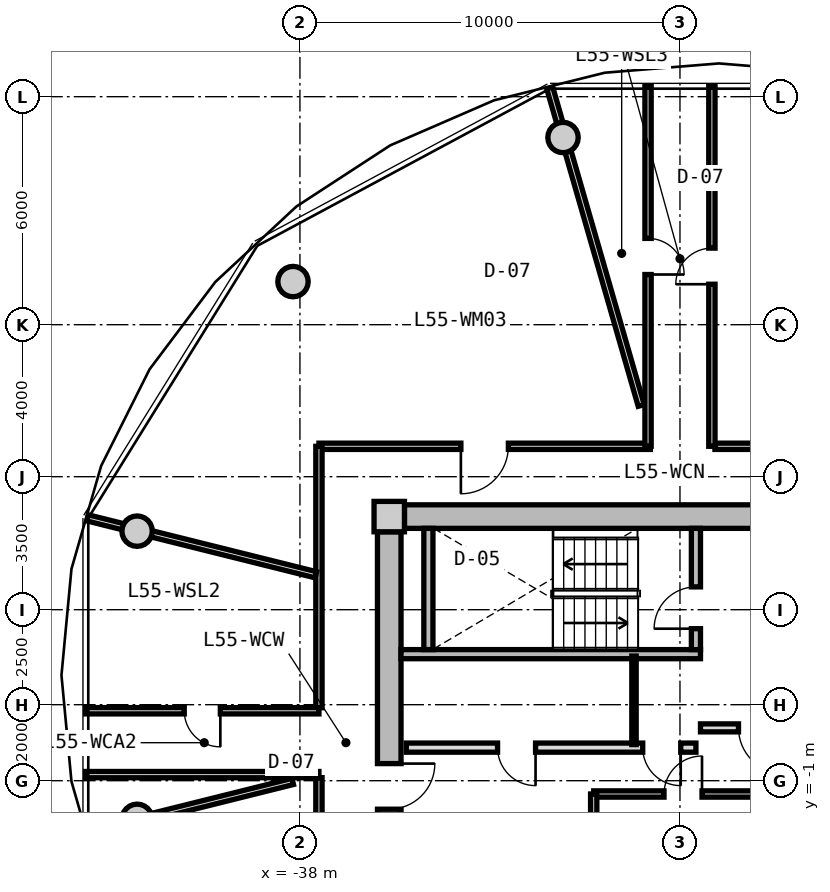
"""IFC4 building model, lengths in metres.
Left out: names, types, materials, properties, quantities, classifications, styles, units other than length and angle.
Written with IfcOpenShell. Run it as: python <this file> out.ifc"""

import sys

from ifc_helpers import new_model, si_unit, direction, frame, frame_2d, origin, origin_2d, place, context, subcontext, project, spatial, rectangle, circle, extrude, source, transform, mapped, element, fill, save


model = new_model("IFC4")
c1 = context("Model", 3, precision=1e-05, world=origin(), true_north=direction((0.0, 1.0)))
c2 = subcontext(c1, "Body", "Model", "MODEL_VIEW")
j1 = project(units=[si_unit("LENGTHUNIT", "METRE"), si_unit("PLANEANGLEUNIT", "RADIAN")], contexts=[c1])
p1 = place(None, origin())
s1 = spatial("IfcSite", under=j1, at=p1, CompositionType="ELEMENT")
p2 = place(p1, origin())
s2 = spatial("IfcBuilding", under=s1, at=p2, CompositionType="ELEMENT")
p3 = place(p2, frame((0.0, 0.0, 177.0)))
s3 = spatial("IfcBuildingStorey", under=s2, at=p3, CompositionType="ELEMENT", Elevation=177.0)
m1 = source(origin(), c2, "Body", "SweptSolid", [
    extrude(rectangle(XDim=0.8, YDim=0.8, at=origin_2d()), origin(), (0.0, 0.0, 1.0), 3.05),
])
p4 = place(p3, frame((-35.65, 5.95, 0.0), z_axis=(0.0, 0.0, 1.0), x_axis=(1.0, 0.0, 0.0)))
e1 = element("IfcColumn", 1, at=p4, inside=s3, PredefinedType="COLUMN", context=c2, shape_type="MappedRepresentation", body=[
    mapped(m1, transform((0.0, 0.0, 0.0), x_axis=(1.0, 0.0, 0.0), y_axis=(0.0, 1.0, 0.0), z_axis=(0.0, 0.0, 1.0), scale=1.0)),
])
m2 = source(origin(), c2, "Body", "SweptSolid", [
    extrude(rectangle(XDim=14.5, YDim=0.62, at=frame_2d((7.25, 0.0))), origin(), (0.0, 0.0, 1.0), 2.81),
])
p5 = place(p3, frame((-35.25, 5.95, 0.0), z_axis=(0.0, 0.0, 1.0), x_axis=(1.0, 0.0, 0.0)))
e2 = element("IfcWall", 2, at=p5, inside=s3, PredefinedType="SHEAR", context=c2, shape_type="MappedRepresentation", body=[
    mapped(m2, transform((0.0, 0.0, 0.0), x_axis=(1.0, 0.0, 0.0), y_axis=(0.0, 1.0, 0.0), z_axis=(0.0, 0.0, 1.0), scale=1.0)),
])
m3 = source(origin(), c2, "Body", "SweptSolid", [
    extrude(rectangle(XDim=11.1, YDim=0.62, at=frame_2d((5.55, 0.0))), origin(), (0.0, 0.0, 1.0), 2.81),
])
p6 = place(p3, frame((-35.65, -5.55, 0.0), z_axis=(0.0, 0.0, 1.0), x_axis=(0.0, 1.0, 0.0)))
e3 = element("IfcWall", 3, at=p6, inside=s3, PredefinedType="SHEAR", context=c2, shape_type="MappedRepresentation", body=[
    mapped(m3, transform((0.0, 0.0, 0.0), x_axis=(1.0, 0.0, 0.0), y_axis=(0.0, 1.0, 0.0), z_axis=(0.0, 0.0, 1.0), scale=1.0)),
])
p7 = place(p6, frame((3.8, 0.0, 0.0)))
e4 = element("IfcOpeningElement", 4, at=p7, cuts=e3, PredefinedType="OPENING", context=c2, shape_type="SweptSolid", body=[
    extrude(rectangle(XDim=1.2, YDim=2.15, at=frame_2d((0.6, 1.075))), frame((0.0, 0.32, 0.0), z_axis=(0.0, -1.0, 0.0), x_axis=(1.0, 0.0, 0.0)), (0.0, 0.0, 1.0), 0.64),
])
m4 = source(origin(), c2, "Body", "SweptSolid", [
    extrude(circle(Radius=0.4, at=origin_2d()), origin(), (0.0, 0.0, 1.0), 3.05),
])
for number, where, z_axis, x_axis in (
    (5, (-31.077, 15.926, 0.0), (0.0, 0.0, 1.0), (1.0, 0.0, 0.0)),
    (6, (-38.183, 12.135, 0.0), (0.0, 0.0, 1.0), (1.0, 0.0, 0.0)),
    (7, (-42.285, 5.567, 0.0), (0.0, 0.0, 1.0), (1.0, 0.0, 0.0)),
    (8, (-42.285, -2.016, 0.0), (0.0, 0.0, 1.0), (1.0, 0.0, 0.0)),
):
    element("IfcColumn", number, at=place(p3, frame(where, z_axis=z_axis, x_axis=x_axis)), inside=s3, PredefinedType="COLUMN", context=c2, shape_type="MappedRepresentation", body=[
        mapped(m4, transform((0.0, 0.0, 0.0), x_axis=(1.0, 0.0, 0.0), y_axis=(0.0, 1.0, 0.0), z_axis=(0.0, 0.0, 1.0), scale=1.0)),
    ])
m5 = source(origin(), c2, "Body", "SweptSolid", [
    extrude(rectangle(XDim=7.88, YDim=0.24, at=frame_2d((3.94, 0.0))), origin(), (0.0, 0.0, 1.0), 2.81),
])
p8 = place(p3, frame((-35.34, 2.33, 0.0), z_axis=(0.0, 0.0, 1.0), x_axis=(1.0, 0.0, 0.0)))
e9 = element("IfcWall", 9, at=p8, inside=s3, PredefinedType="PARTITIONING", context=c2, shape_type="MappedRepresentation", body=[
    mapped(m5, transform((0.0, 0.0, 0.0), x_axis=(1.0, 0.0, 0.0), y_axis=(0.0, 1.0, 0.0), z_axis=(0.0, 0.0, 1.0), scale=1.0)),
])
m6 = source(origin(), c2, "Body", "SweptSolid", [
    extrude(rectangle(XDim=3.19, YDim=0.24, at=frame_2d((1.595, 0.0))), origin(), (0.0, 0.0, 1.0), 2.81),
])
p9 = place(p3, frame((-34.62, 2.45, 0.0), z_axis=(0.0, 0.0, 1.0), x_axis=(0.0, 1.0, 0.0)))
e10 = element("IfcWall", 10, at=p9, inside=s3, PredefinedType="PARTITIONING", context=c2, shape_type="MappedRepresentation", body=[
    mapped(m6, transform((0.0, 0.0, 0.0), x_axis=(1.0, 0.0, 0.0), y_axis=(0.0, 1.0, 0.0), z_axis=(0.0, 0.0, 1.0), scale=1.0)),
])
p10 = place(p3, frame((-27.58, 2.45, 0.0), z_axis=(0.0, 0.0, 1.0), x_axis=(0.0, 1.0, 0.0)))
e11 = element("IfcWall", 11, at=p10, inside=s3, PredefinedType="PARTITIONING", context=c2, shape_type="MappedRepresentation", body=[
    mapped(m6, transform((0.0, 0.0, 0.0), x_axis=(1.0, 0.0, 0.0), y_axis=(0.0, 1.0, 0.0), z_axis=(0.0, 0.0, 1.0), scale=1.0)),
])
p11 = place(p10, frame((0.55, 0.0, 0.0)))
e12 = element("IfcOpeningElement", 12, at=p11, cuts=e11, PredefinedType="OPENING", context=c2, shape_type="SweptSolid", body=[
    extrude(rectangle(XDim=1.1, YDim=2.15, at=frame_2d((0.55, 1.075))), frame((0.0, 0.13, 0.0), z_axis=(0.0, -1.0, 0.0), x_axis=(1.0, 0.0, 0.0)), (0.0, 0.0, 1.0), 0.26),
])
m7 = source(origin(), c2, "Body", "SweptSolid", [
    extrude(rectangle(XDim=6.66, YDim=0.21, at=frame_2d((3.33, 0.0))), origin(), (0.0, 0.0, 1.0), 2.795),
])
p12 = place(p3, frame((-27.46, 0.39, 0.0), z_axis=(0.0, 0.0, 1.0), x_axis=(1.0, 0.0, 0.0)))
e13 = element("IfcWall", 13, at=p12, inside=s3, PredefinedType="PARTITIONING", context=c2, shape_type="MappedRepresentation", body=[
    mapped(m7, transform((0.0, 0.0, 0.0), x_axis=(1.0, 0.0, 0.0), y_axis=(0.0, 1.0, 0.0), z_axis=(0.0, 0.0, 1.0), scale=1.0)),
])
p13 = place(p12, frame((1.0, 0.0, 0.0)))
e14 = element("IfcOpeningElement", 14, at=p13, cuts=e13, PredefinedType="OPENING", context=c2, shape_type="SweptSolid", body=[
    extrude(rectangle(XDim=1.2, YDim=2.15, at=frame_2d((0.6, 1.075))), frame((0.0, 0.115, 0.0), z_axis=(0.0, -1.0, 0.0), x_axis=(1.0, 0.0, 0.0)), (0.0, 0.0, 1.0), 0.23),
])
m8 = source(origin(), c2, "Body", "SweptSolid", [
    extrude(rectangle(XDim=7.62, YDim=0.24, at=frame_2d((3.81, 0.0))), origin(), (0.0, 0.0, 1.0), 2.795),
])
p14 = place(p3, frame((-35.2, -0.13, 0.0), z_axis=(0.0, 0.0, 1.0), x_axis=(1.0, 0.0, 0.0)))
e15 = element("IfcWall", 15, at=p14, inside=s3, PredefinedType="PARTITIONING", context=c2, shape_type="MappedRepresentation", body=[
    mapped(m8, transform((0.0, 0.0, 0.0), x_axis=(1.0, 0.0, 0.0), y_axis=(0.0, 1.0, 0.0), z_axis=(0.0, 0.0, 1.0), scale=1.0)),
])
p15 = place(p14, frame((6.22, 0.0, 0.0)))
e16 = element("IfcOpeningElement", 16, at=p15, cuts=e15, PredefinedType="OPENING", context=c2, shape_type="SweptSolid", body=[
    extrude(rectangle(XDim=1.0, YDim=2.1, at=frame_2d((0.5, 1.05))), frame((0.0, 0.13, 0.0), z_axis=(0.0, -1.0, 0.0), x_axis=(1.0, 0.0, 0.0)), (0.0, 0.0, 1.0), 0.26),
])
p16 = place(p14, frame((2.4, 0.0, 0.0)))
e17 = element("IfcOpeningElement", 17, at=p16, cuts=e15, PredefinedType="OPENING", context=c2, shape_type="SweptSolid", body=[
    extrude(rectangle(XDim=1.0, YDim=2.1, at=frame_2d((0.5, 1.05))), frame((0.0, 0.13, 0.0), z_axis=(0.0, -1.0, 0.0), x_axis=(1.0, 0.0, 0.0)), (0.0, 0.0, 1.0), 0.26),
])
m9 = source(origin(), c2, "Body", "SweptSolid", [
    extrude(rectangle(XDim=2.33, YDim=0.115, at=frame_2d((1.165, 0.0))), origin(), (0.0, 0.0, 1.0), 2.795),
])
p17 = place(p3, frame((-29.21, -0.05, 0.0), z_axis=(0.0, 0.0, 1.0), x_axis=(0.0, 1.0, 0.0)))
e18 = element("IfcWall", 18, at=p17, inside=s3, PredefinedType="PARTITIONING", context=c2, shape_type="MappedRepresentation", body=[
    mapped(m9, transform((0.0, 0.0, 0.0), x_axis=(1.0, 0.0, 0.0), y_axis=(0.0, 1.0, 0.0), z_axis=(0.0, 0.0, 1.0), scale=1.0)),
])
m10 = source(origin(), c2, "Body", "SweptSolid", [
    extrude(rectangle(XDim=4.77, YDim=0.165, at=frame_2d((2.385, 0.0))), origin(), (0.0, 0.0, 1.0), 2.795),
])
p18 = place(p3, frame((-30.27, -1.35, 0.0), z_axis=(0.0, 0.0, 1.0), x_axis=(1.0, 0.0, 0.0)))
e19 = element("IfcWall", 19, at=p18, inside=s3, PredefinedType="PARTITIONING", context=c2, shape_type="MappedRepresentation", body=[
    mapped(m10, transform((0.0, 0.0, 0.0), x_axis=(1.0, 0.0, 0.0), y_axis=(0.0, 1.0, 0.0), z_axis=(0.0, 0.0, 1.0), scale=1.0)),
])
p19 = place(p18, frame((1.85, 0.0, 0.0)))
e20 = element("IfcOpeningElement", 20, at=p19, cuts=e19, PredefinedType="OPENING", context=c2, shape_type="SweptSolid", body=[
    extrude(rectangle(XDim=1.0, YDim=2.1, at=frame_2d((0.5, 1.05))), frame((0.0, 0.093, 0.0), z_axis=(0.0, -1.0, 0.0), x_axis=(1.0, 0.0, 0.0)), (0.0, 0.0, 1.0), 0.185),
])
m11 = source(origin(), c2, "Body", "SweptSolid", [
    extrude(rectangle(XDim=0.98, YDim=0.165, at=frame_2d((0.49, 0.0))), origin(), (0.0, 0.0, 1.0), 2.795),
])
p20 = place(p3, frame((-30.27, -2.33, 0.0), z_axis=(0.0, 0.0, 1.0), x_axis=(0.0, 1.0, 0.0)))
e21 = element("IfcWall", 21, at=p20, inside=s3, PredefinedType="PARTITIONING", context=c2, shape_type="MappedRepresentation", body=[
    mapped(m11, transform((0.0, 0.0, 0.0), x_axis=(1.0, 0.0, 0.0), y_axis=(0.0, 1.0, 0.0), z_axis=(0.0, 0.0, 1.0), scale=1.0)),
])
m12 = source(origin(), c2, "Body", "SweptSolid", [
    extrude(rectangle(XDim=8.719, YDim=0.165, at=frame_2d((4.36, 0.0))), origin(), (0.0, 0.0, 1.0), 2.795),
])
p21 = place(p3, frame((-37.5, 7.8, 0.0), z_axis=(0.0, 0.0, 1.0), x_axis=(1.0, 0.0, 0.0)))
e22 = element("IfcWall", 22, at=p21, inside=s3, PredefinedType="PARTITIONING", context=c2, shape_type="MappedRepresentation", body=[
    mapped(m12, transform((0.0, 0.0, 0.0), x_axis=(1.0, 0.0, 0.0), y_axis=(0.0, 1.0, 0.0), z_axis=(0.0, 0.0, 1.0), scale=1.0)),
])
p22 = place(p21, frame((3.735, 0.0, 0.0)))
e23 = element("IfcOpeningElement", 23, at=p22, cuts=e22, PredefinedType="OPENING", context=c2, shape_type="SweptSolid", body=[
    extrude(rectangle(XDim=1.25, YDim=2.2, at=frame_2d((0.625, 1.1))), frame((0.0, 0.093, 0.0), z_axis=(0.0, -1.0, 0.0), x_axis=(1.0, 0.0, 0.0)), (0.0, 0.0, 1.0), 0.185),
])
m13 = source(origin(), c2, "Body", "SweptSolid", [
    extrude(rectangle(XDim=8.58, YDim=0.165, at=frame_2d((4.29, 0.0))), origin(), (0.0, 0.0, 1.0), 2.795),
])
p23 = place(p3, frame((-27.08, 7.8, 0.0), z_axis=(0.0, 0.0, 1.0), x_axis=(1.0, 0.0, 0.0)))
e24 = element("IfcWall", 24, at=p23, inside=s3, PredefinedType="PARTITIONING", context=c2, shape_type="MappedRepresentation", body=[
    mapped(m13, transform((0.0, 0.0, 0.0), x_axis=(1.0, 0.0, 0.0), y_axis=(0.0, 1.0, 0.0), z_axis=(0.0, 0.0, 1.0), scale=1.0)),
])
p24 = place(p23, frame((6.94, 0.0, 0.0)))
e25 = element("IfcOpeningElement", 25, at=p24, cuts=e24, PredefinedType="OPENING", context=c2, shape_type="SweptSolid", body=[
    extrude(rectangle(XDim=1.05, YDim=2.15, at=frame_2d((0.525, 1.075))), frame((0.0, 0.093, 0.0), z_axis=(0.0, -1.0, 0.0), x_axis=(1.0, 0.0, 0.0)), (0.0, 0.0, 1.0), 0.185),
])
p25 = place(p23, frame((5.197, 0.0, 0.0)))
e26 = element("IfcOpeningElement", 26, at=p25, cuts=e24, PredefinedType="OPENING", context=c2, shape_type="SweptSolid", body=[
    extrude(rectangle(XDim=0.92, YDim=2.1, at=frame_2d((0.46, 1.05))), frame((0.0, 0.093, 0.0), z_axis=(0.0, -1.0, 0.0), x_axis=(1.0, 0.0, 0.0)), (0.0, 0.0, 1.0), 0.185),
])
p26 = place(p23, frame((2.778, 0.0, 0.0)))
e27 = element("IfcOpeningElement", 27, at=p26, cuts=e24, PredefinedType="OPENING", context=c2, shape_type="SweptSolid", body=[
    extrude(rectangle(XDim=0.92, YDim=2.1, at=frame_2d((0.46, 1.05))), frame((0.0, 0.093, 0.0), z_axis=(0.0, -1.0, 0.0), x_axis=(1.0, 0.0, 0.0)), (0.0, 0.0, 1.0), 0.185),
])
m14 = source(origin(), c2, "Body", "SweptSolid", [
    extrude(rectangle(XDim=6.88, YDim=0.165, at=frame_2d((3.44, 0.0))), origin(), (0.0, 0.0, 1.0), 2.795),
])
for number, where, z_axis, x_axis in (
    (28, (-37.5, -7.8, 0.0), (0.0, 0.0, 1.0), (0.0, 1.0, 0.0)),
    (29, (-37.5, 0.92, 0.0), (0.0, 0.0, 1.0), (0.0, 1.0, 0.0)),
):
    element("IfcWall", number, at=place(p3, frame(where, z_axis=z_axis, x_axis=x_axis)), inside=s3, PredefinedType="PARTITIONING", context=c2, shape_type="MappedRepresentation", body=[
        mapped(m14, transform((0.0, 0.0, 0.0), x_axis=(1.0, 0.0, 0.0), y_axis=(0.0, 1.0, 0.0), z_axis=(0.0, 0.0, 1.0), scale=1.0)),
    ])
m15 = source(origin(), c2, "Body", "SweptSolid", [
    extrude(rectangle(XDim=8.695, YDim=0.165, at=frame_2d((4.348, 0.0))), origin(), (0.0, 0.0, 1.0), 2.345),
])
p27 = place(p3, frame((-29.02, 8.875, 0.0), z_axis=(0.0, 0.0, 1.0), x_axis=(-0.276797231892, 0.960928349263, 0.0)))
e30 = element("IfcWall", 30, at=p27, inside=s3, PredefinedType="PARTITIONING", context=c2, shape_type="MappedRepresentation", body=[
    mapped(m15, transform((0.0, 0.0, 0.0), x_axis=(1.0, 0.0, 0.0), y_axis=(0.0, 1.0, 0.0), z_axis=(0.0, 0.0, 1.0), scale=1.0)),
])
m16 = source(origin(), c2, "Body", "SweptSolid", [
    extrude(rectangle(XDim=6.193, YDim=0.165, at=frame_2d((3.096, 0.0))), origin(), (0.0, 0.0, 1.0), 2.345),
])
p28 = place(p3, frame((-37.58, 4.419, 0.0), z_axis=(0.0, 0.0, 1.0), x_axis=(-0.970309243466, 0.241867674657, 0.0)))
e31 = element("IfcWall", 31, at=p28, inside=s3, PredefinedType="PARTITIONING", context=c2, shape_type="MappedRepresentation", body=[
    mapped(m16, transform((0.0, 0.0, 0.0), x_axis=(1.0, 0.0, 0.0), y_axis=(0.0, 1.0, 0.0), z_axis=(0.0, 0.0, 1.0), scale=1.0)),
])
m17 = source(origin(), c2, "Body", "SweptSolid", [
    extrude(rectangle(XDim=5.564, YDim=0.165, at=frame_2d((2.782, 0.0))), origin(), (0.0, 0.0, 1.0), 2.345),
])
p29 = place(p3, frame((-38.19, -1.02, 0.0), z_axis=(0.0, 0.0, 1.0), x_axis=(-0.97031260977, -0.241854169533, 0.0)))
e32 = element("IfcWall", 32, at=p29, inside=s3, PredefinedType="PARTITIONING", context=c2, shape_type="MappedRepresentation", body=[
    mapped(m17, transform((0.0, 0.0, 0.0), x_axis=(1.0, 0.0, 0.0), y_axis=(0.0, 1.0, 0.0), z_axis=(0.0, 0.0, 1.0), scale=1.0)),
])
m18 = source(origin(), c2, "Body", "SweptSolid", [
    extrude(rectangle(XDim=9.48, YDim=0.165, at=frame_2d((4.74, 0.0))), origin(), (0.0, 0.0, 1.0), 2.795),
])
p30 = place(p3, frame((-28.84, 7.8, 0.0), z_axis=(0.0, 0.0, 1.0), x_axis=(0.0, 1.0, 0.0)))
e33 = element("IfcWall", 33, at=p30, inside=s3, PredefinedType="PARTITIONING", context=c2, shape_type="MappedRepresentation", body=[
    mapped(m18, transform((0.0, 0.0, 0.0), x_axis=(1.0, 0.0, 0.0), y_axis=(0.0, 1.0, 0.0), z_axis=(0.0, 0.0, 1.0), scale=1.0)),
])
p31 = place(p30, frame((4.521, 0.0, 0.0)))
e34 = element("IfcOpeningElement", 34, at=p31, cuts=e33, PredefinedType="OPENING", context=c2, shape_type="SweptSolid", body=[
    extrude(rectangle(XDim=0.95, YDim=2.1, at=frame_2d((0.475, 1.05))), frame((0.0, 0.093, 0.0), z_axis=(0.0, -1.0, 0.0), x_axis=(1.0, 0.0, 0.0)), (0.0, 0.0, 1.0), 0.185),
])
p32 = place(p3, frame((-27.16, 17.28, 0.0), z_axis=(0.0, 0.0, 1.0), x_axis=(0.0, -1.0, 0.0)))
e35 = element("IfcWall", 35, at=p32, inside=s3, PredefinedType="PARTITIONING", context=c2, shape_type="MappedRepresentation", body=[
    mapped(m18, transform((0.0, 0.0, 0.0), x_axis=(1.0, 0.0, 0.0), y_axis=(0.0, 1.0, 0.0), z_axis=(0.0, 0.0, 1.0), scale=1.0)),
])
p33 = place(p32, frame((4.265, 0.0, 0.0)))
e36 = element("IfcOpeningElement", 36, at=p33, cuts=e35, PredefinedType="OPENING", context=c2, shape_type="SweptSolid", body=[
    extrude(rectangle(XDim=0.95, YDim=2.1, at=frame_2d((0.475, 1.05))), frame((0.0, 0.093, 0.0), z_axis=(0.0, -1.0, 0.0), x_axis=(1.0, 0.0, 0.0)), (0.0, 0.0, 1.0), 0.185),
])
m19 = source(origin(), c2, "Body", "SweptSolid", [
    extrude(rectangle(XDim=6.139, YDim=0.165, at=frame_2d((3.069, 0.0))), origin(), (0.0, 0.0, 1.0), 2.795),
])
p34 = place(p3, frame((-43.639, 0.84, 0.0), z_axis=(0.0, 0.0, 1.0), x_axis=(1.0, 0.0, 0.0)))
e37 = element("IfcWall", 37, at=p34, inside=s3, PredefinedType="PARTITIONING", context=c2, shape_type="MappedRepresentation", body=[
    mapped(m19, transform((0.0, 0.0, 0.0), x_axis=(1.0, 0.0, 0.0), y_axis=(0.0, 1.0, 0.0), z_axis=(0.0, 0.0, 1.0), scale=1.0)),
])
p35 = place(p34, frame((2.594, 0.0, 0.0)))
e38 = element("IfcOpeningElement", 38, at=p35, cuts=e37, PredefinedType="OPENING", context=c2, shape_type="SweptSolid", body=[
    extrude(rectangle(XDim=0.95, YDim=2.1, at=frame_2d((0.475, 1.05))), frame((0.0, 0.093, 0.0), z_axis=(0.0, -1.0, 0.0), x_axis=(1.0, 0.0, 0.0)), (0.0, 0.0, 1.0), 0.185),
])
p36 = place(p3, frame((-37.5, -0.84, 0.0), z_axis=(0.0, 0.0, 1.0), x_axis=(-1.0, 0.0, 0.0)))
e39 = element("IfcWall", 39, at=p36, inside=s3, PredefinedType="PARTITIONING", context=c2, shape_type="MappedRepresentation", body=[
    mapped(m19, transform((0.0, 0.0, 0.0), x_axis=(1.0, 0.0, 0.0), y_axis=(0.0, 1.0, 0.0), z_axis=(0.0, 0.0, 1.0), scale=1.0)),
])
m20 = source(origin(), c2, "Body", "SweptSolid", [
    extrude(rectangle(XDim=1.1, YDim=2.15, at=frame_2d((0.55, 1.075))), frame((0.0, 0.025, 0.0), z_axis=(0.0, -1.0, 0.0), x_axis=(1.0, 0.0, 0.0)), (0.0, 0.0, 1.0), 0.05),
])
p37 = place(p11, origin())
e40 = element("IfcDoor", 40, at=p37, inside=s3, OperationType="SINGLE_SWING_LEFT", PredefinedType="DOOR", context=c2, shape_type="MappedRepresentation", body=[
    mapped(m20, transform((0.0, 0.0, 0.0), x_axis=(1.0, 0.0, 0.0), y_axis=(0.0, 1.0, 0.0), z_axis=(0.0, 0.0, 1.0), scale=1.0)),
])
fill(e12, e40)
m21 = source(origin(), c2, "Body", "SweptSolid", [
    extrude(rectangle(XDim=1.2, YDim=2.15, at=frame_2d((0.6, 1.075))), frame((0.0, 0.025, 0.0), z_axis=(0.0, -1.0, 0.0), x_axis=(1.0, 0.0, 0.0)), (0.0, 0.0, 1.0), 0.05),
])
p38 = place(p13, frame((1.2, 0.0, 0.0), z_axis=(0.0, 0.0, 1.0), x_axis=(-1.0, 0.0, 0.0)))
e41 = element("IfcDoor", 41, at=p38, inside=s3, OperationType="SINGLE_SWING_LEFT", PredefinedType="DOOR", context=c2, shape_type="MappedRepresentation", body=[
    mapped(m21, transform((0.0, 0.0, 0.0), x_axis=(1.0, 0.0, 0.0), y_axis=(0.0, 1.0, 0.0), z_axis=(0.0, 0.0, 1.0), scale=1.0)),
])
fill(e14, e41)
p39 = place(p7, frame((1.2, 0.0, 0.0), z_axis=(0.0, 0.0, 1.0), x_axis=(-1.0, 0.0, 0.0)))
e42 = element("IfcDoor", 42, at=p39, inside=s3, OperationType="SINGLE_SWING_LEFT", PredefinedType="DOOR", context=c2, shape_type="MappedRepresentation", body=[
    mapped(m21, transform((0.0, 0.0, 0.0), x_axis=(1.0, 0.0, 0.0), y_axis=(0.0, 1.0, 0.0), z_axis=(0.0, 0.0, 1.0), scale=1.0)),
])
fill(e4, e42)
m22 = source(origin(), c2, "Body", "SweptSolid", [
    extrude(rectangle(XDim=1.0, YDim=2.1, at=frame_2d((0.5, 1.05))), frame((0.0, 0.025, 0.0), z_axis=(0.0, -1.0, 0.0), x_axis=(1.0, 0.0, 0.0)), (0.0, 0.0, 1.0), 0.05),
])
p40 = place(p15, frame((1.0, 0.0, 0.0), z_axis=(0.0, 0.0, 1.0), x_axis=(-1.0, 0.0, 0.0)))
e43 = element("IfcDoor", 43, at=p40, inside=s3, OperationType="SINGLE_SWING_LEFT", PredefinedType="DOOR", context=c2, shape_type="MappedRepresentation", body=[
    mapped(m22, transform((0.0, 0.0, 0.0), x_axis=(1.0, 0.0, 0.0), y_axis=(0.0, 1.0, 0.0), z_axis=(0.0, 0.0, 1.0), scale=1.0)),
])
fill(e16, e43)
p41 = place(p16, frame((1.0, 0.0, 0.0), z_axis=(0.0, 0.0, 1.0), x_axis=(-1.0, 0.0, 0.0)))
e44 = element("IfcDoor", 44, at=p41, inside=s3, OperationType="SINGLE_SWING_LEFT", PredefinedType="DOOR", context=c2, shape_type="MappedRepresentation", body=[
    mapped(m22, transform((0.0, 0.0, 0.0), x_axis=(1.0, 0.0, 0.0), y_axis=(0.0, 1.0, 0.0), z_axis=(0.0, 0.0, 1.0), scale=1.0)),
])
fill(e17, e44)
p42 = place(p19, origin())
e45 = element("IfcDoor", 45, at=p42, inside=s3, OperationType="SINGLE_SWING_RIGHT", PredefinedType="DOOR", context=c2, shape_type="MappedRepresentation", body=[
    mapped(m22, transform((0.0, 0.0, 0.0), x_axis=(1.0, 0.0, 0.0), y_axis=(0.0, 1.0, 0.0), z_axis=(0.0, 0.0, 1.0), scale=1.0)),
])
fill(e20, e45)
m23 = source(origin(), c2, "Body", "SweptSolid", [
    extrude(rectangle(XDim=0.95, YDim=2.1, at=frame_2d((0.475, 1.05))), frame((0.0, 0.025, 0.0), z_axis=(0.0, -1.0, 0.0), x_axis=(1.0, 0.0, 0.0)), (0.0, 0.0, 1.0), 0.05),
])
p43 = place(p35, frame((0.95, 0.0, 0.0), z_axis=(0.0, 0.0, 1.0), x_axis=(-1.0, 0.0, 0.0)))
e46 = element("IfcDoor", 46, at=p43, inside=s3, OperationType="SINGLE_SWING_LEFT", PredefinedType="DOOR", context=c2, shape_type="MappedRepresentation", body=[
    mapped(m23, transform((0.0, 0.0, 0.0), x_axis=(1.0, 0.0, 0.0), y_axis=(0.0, 1.0, 0.0), z_axis=(0.0, 0.0, 1.0), scale=1.0)),
])
fill(e38, e46)
p44 = place(p31, frame((0.95, 0.0, 0.0), z_axis=(0.0, 0.0, 1.0), x_axis=(-1.0, 0.0, 0.0)))
e47 = element("IfcDoor", 47, at=p44, inside=s3, OperationType="SINGLE_SWING_RIGHT", PredefinedType="DOOR", context=c2, shape_type="MappedRepresentation", body=[
    mapped(m23, transform((0.0, 0.0, 0.0), x_axis=(1.0, 0.0, 0.0), y_axis=(0.0, 1.0, 0.0), z_axis=(0.0, 0.0, 1.0), scale=1.0)),
])
fill(e34, e47)
p45 = place(p33, frame((0.95, 0.0, 0.0), z_axis=(0.0, 0.0, 1.0), x_axis=(-1.0, 0.0, 0.0)))
e48 = element("IfcDoor", 48, at=p45, inside=s3, OperationType="SINGLE_SWING_LEFT", PredefinedType="DOOR", context=c2, shape_type="MappedRepresentation", body=[
    mapped(m23, transform((0.0, 0.0, 0.0), x_axis=(1.0, 0.0, 0.0), y_axis=(0.0, 1.0, 0.0), z_axis=(0.0, 0.0, 1.0), scale=1.0)),
])
fill(e36, e48)
m24 = source(origin(), c2, "Body", "SweptSolid", [
    extrude(rectangle(XDim=1.25, YDim=2.2, at=frame_2d((0.625, 1.1))), frame((0.0, 0.025, 0.0), z_axis=(0.0, -1.0, 0.0), x_axis=(1.0, 0.0, 0.0)), (0.0, 0.0, 1.0), 0.05),
])
p46 = place(p22, frame((1.25, 0.0, 0.0), z_axis=(0.0, 0.0, 1.0), x_axis=(-1.0, 0.0, 0.0)))
e49 = element("IfcDoor", 49, at=p46, inside=s3, OperationType="SINGLE_SWING_RIGHT", PredefinedType="DOOR", context=c2, shape_type="MappedRepresentation", body=[
    mapped(m24, transform((0.0, 0.0, 0.0), x_axis=(1.0, 0.0, 0.0), y_axis=(0.0, 1.0, 0.0), z_axis=(0.0, 0.0, 1.0), scale=1.0)),
])
fill(e23, e49)
save(model, sys.argv[1])
